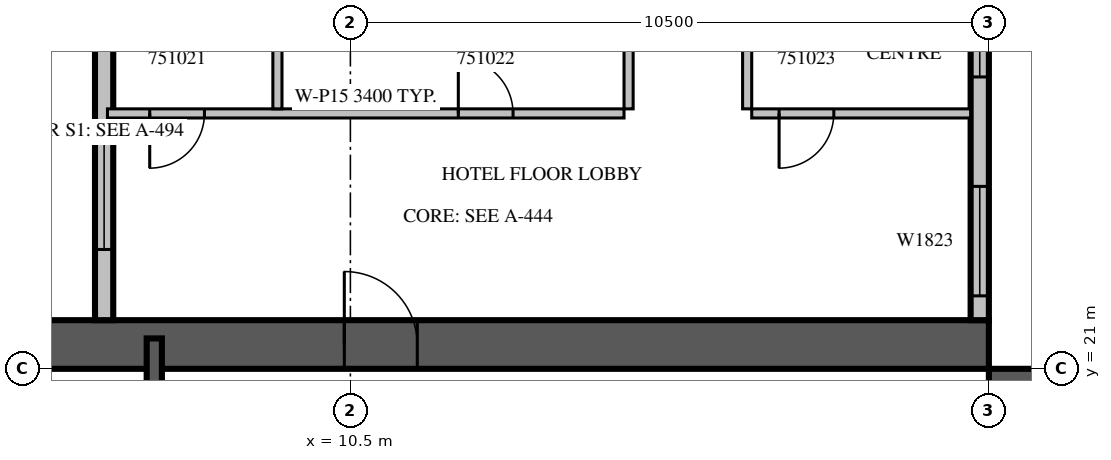
"""IFC4 building model, lengths in metres.
Left out: names, types, materials, properties, quantities, classifications, styles, units other than length and angle.
Written with IfcOpenShell. Run it as: python <this file> out.ifc"""

import sys

from ifc_helpers import new_model, si_unit, direction, frame, frame_2d, origin, place, context, subcontext, project, spatial, rectangle, extrude, source, transform, mapped, element, fill, save


model = new_model("IFC4")
c1 = context("Model", 3, precision=1e-05, world=origin(), true_north=direction((0.0, 1.0)))
c2 = subcontext(c1, "Body", "Model", "MODEL_VIEW")
j1 = project(units=[si_unit("LENGTHUNIT", "METRE"), si_unit("PLANEANGLEUNIT", "RADIAN")], contexts=[c1])
p1 = place(None, origin())
s1 = spatial("IfcSite", under=j1, at=p1, CompositionType="ELEMENT")
p2 = place(p1, origin())
s2 = spatial("IfcBuilding", under=s1, at=p2, CompositionType="ELEMENT")
p3 = place(p2, frame((0.0, 0.0, 227.2)))
s3 = spatial("IfcBuildingStorey", under=s2, at=p3, CompositionType="ELEMENT", Elevation=227.2)
m1 = source(origin(), c2, "Body", "SweptSolid", [
    extrude(rectangle(XDim=16.8, YDim=0.8, at=frame_2d((8.4, 0.0))), origin(), (0.0, 0.0, 1.0), 3.8),
])
p4 = place(p3, frame((21.4, 4.2, 0.0), z_axis=(0.0, 0.0, 1.0), x_axis=(0.0, 1.0, 0.0)))
e1 = element("IfcWall", 1, at=p4, inside=s3, PredefinedType="SHEAR", context=c2, shape_type="MappedRepresentation", body=[
    mapped(m1, transform((0.0, 0.0, 0.0), scale=1.0)),
])
m2 = source(origin(), c2, "Body", "SweptSolid", [
    extrude(rectangle(XDim=2.2, YDim=2.1, at=frame_2d((1.1, 1.05))), frame((0.0, 0.41, 0.0), z_axis=(0.0, -1.0, 0.0), x_axis=(1.0, 0.0, 0.0)), (0.0, 0.0, 1.0), 0.82),
])
p5 = place(p4, frame((4.2, 0.0, 0.0)))
e2 = element("IfcOpeningElement", 2, at=p5, cuts=e1, PredefinedType="OPENING", context=c2, shape_type="MappedRepresentation", body=[
    mapped(m2, transform((0.0, 0.0, 0.0), scale=1.0)),
])
m3 = source(origin(), c2, "Body", "SweptSolid", [
    extrude(rectangle(XDim=1.2, YDim=2.1, at=frame_2d((0.6, 1.05))), frame((0.0, 0.41, 0.0), z_axis=(0.0, -1.0, 0.0), x_axis=(1.0, 0.0, 0.0)), (0.0, 0.0, 1.0), 0.82),
])
p6 = place(p4, frame((14.7, 0.0, 0.0)))
e3 = element("IfcOpeningElement", 3, at=p6, cuts=e1, PredefinedType="OPENING", context=c2, shape_type="MappedRepresentation", body=[
    mapped(m3, transform((0.0, 0.0, 0.0), scale=1.0)),
])
p7 = place(p3, frame((4.2, 21.4, 0.0), z_axis=(0.0, 0.0, 1.0), x_axis=(1.0, 0.0, 0.0)))
e4 = element("IfcWall", 4, at=p7, inside=s3, PredefinedType="SHEAR", context=c2, shape_type="MappedRepresentation", body=[
    mapped(m1, transform((0.0, 0.0, 0.0), scale=1.0)),
])
p8 = place(p7, frame((6.2, 0.0, 0.0)))
e5 = element("IfcOpeningElement", 5, at=p8, cuts=e4, PredefinedType="OPENING", context=c2, shape_type="MappedRepresentation", body=[
    mapped(m3, transform((0.0, 0.0, 0.0), scale=1.0)),
])
m4 = source(origin(), c2, "Body", "SweptSolid", [
    extrude(rectangle(XDim=7.2, YDim=0.3, at=frame_2d((3.6, 0.0))), origin(), (0.0, 0.0, 1.0), 3.4),
])
p9 = place(p3, frame((20.85, 21.8, 0.0), z_axis=(0.0, 0.0, 1.0), x_axis=(0.0, 1.0, 0.0)))
e6 = element("IfcWall", 6, at=p9, inside=s3, PredefinedType="STANDARD", context=c2, shape_type="MappedRepresentation", body=[
    mapped(m4, transform((0.0, 0.0, 0.0), scale=1.0)),
])
m5 = source(origin(), c2, "Body", "SweptSolid", [
    extrude(rectangle(XDim=1.8, YDim=2.3, at=frame_2d((0.9, 1.15))), frame((0.0, 0.16, 0.0), z_axis=(0.0, -1.0, 0.0), x_axis=(1.0, 0.0, 0.0)), (0.0, 0.0, 1.0), 0.32),
])
p10 = place(p9, frame((0.4, 0.0, 0.6)))
e7 = element("IfcOpeningElement", 7, at=p10, cuts=e6, PredefinedType="OPENING", context=c2, shape_type="MappedRepresentation", body=[
    mapped(m5, transform((0.0, 0.0, 0.0), scale=1.0)),
])
m6 = source(origin(), c2, "Body", "SweptSolid", [
    extrude(rectangle(XDim=3.0, YDim=2.3, at=frame_2d((1.5, 1.15))), frame((0.0, 0.16, 0.0), z_axis=(0.0, -1.0, 0.0), x_axis=(1.0, 0.0, 0.0)), (0.0, 0.0, 1.0), 0.32),
])
p11 = place(p9, frame((4.0, 0.0, 0.6)))
e8 = element("IfcOpeningElement", 8, at=p11, cuts=e6, PredefinedType="OPENING", context=c2, shape_type="MappedRepresentation", body=[
    mapped(m6, transform((0.0, 0.0, 0.0), scale=1.0)),
])
m7 = source(origin(), c2, "Body", "SweptSolid", [
    extrude(rectangle(XDim=8.6, YDim=0.3, at=frame_2d((4.3, 0.0))), origin(), (0.0, 0.0, 1.0), 3.4),
])
p12 = place(p3, frame((6.45, 30.4, 0.0), z_axis=(0.0, 0.0, 1.0), x_axis=(0.0, -1.0, 0.0)))
e9 = element("IfcWall", 9, at=p12, inside=s3, PredefinedType="STANDARD", context=c2, shape_type="MappedRepresentation", body=[
    mapped(m7, transform((0.0, 0.0, 0.0), scale=1.0)),
])
p13 = place(p12, frame((1.438, 0.0, 0.6)))
e10 = element("IfcOpeningElement", 10, at=p13, cuts=e9, PredefinedType="OPENING", context=c2, shape_type="MappedRepresentation", body=[
    mapped(m5, transform((0.0, 0.0, 0.0), scale=1.0)),
])
p14 = place(p12, frame((5.638, 0.0, 0.6)))
e11 = element("IfcOpeningElement", 11, at=p14, cuts=e9, PredefinedType="OPENING", context=c2, shape_type="MappedRepresentation", body=[
    mapped(m5, transform((0.0, 0.0, 0.0), scale=1.0)),
])
m8 = source(origin(), c2, "Body", "SweptSolid", [
    extrude(rectangle(XDim=6.6, YDim=0.25, at=frame_2d((3.3, 0.0))), origin(), (0.0, 0.0, 1.0), 3.4),
])
p15 = place(p3, frame((7.275, 14.9, 0.0), z_axis=(0.0, 0.0, 1.0), x_axis=(0.0, 1.0, 0.0)))
e12 = element("IfcWall", 12, at=p15, inside=s3, PredefinedType="SOLIDWALL", context=c2, shape_type="MappedRepresentation", body=[
    mapped(m8, transform((0.0, 0.0, 0.0), scale=1.0)),
])
m9 = source(origin(), c2, "Body", "SweptSolid", [
    extrude(rectangle(XDim=1.1, YDim=2.1, at=frame_2d((0.55, 1.05))), frame((0.0, 0.135, 0.0), z_axis=(0.0, -1.0, 0.0), x_axis=(1.0, 0.0, 0.0)), (0.0, 0.0, 1.0), 0.27),
])
p16 = place(p15, frame((0.15, 0.0, 0.0)))
e13 = element("IfcOpeningElement", 13, at=p16, cuts=e12, PredefinedType="OPENING", context=c2, shape_type="MappedRepresentation", body=[
    mapped(m9, transform((0.0, 0.0, 0.0), scale=1.0)),
])
m10 = source(origin(), c2, "Body", "SweptSolid", [
    extrude(rectangle(XDim=8.495, YDim=0.15, at=frame_2d((4.247, 0.0))), origin(), (0.0, 0.0, 1.0), 3.4),
])
p17 = place(p3, frame((6.505, 25.2, 0.0), z_axis=(0.0, 0.0, 1.0), x_axis=(1.0, 0.0, 0.0)))
e14 = element("IfcWall", 14, at=p17, inside=s3, PredefinedType="PARTITIONING", context=c2, shape_type="MappedRepresentation", body=[
    mapped(m10, transform((0.0, 0.0, 0.0), scale=1.0)),
])
m11 = source(origin(), c2, "Body", "SweptSolid", [
    extrude(rectangle(XDim=0.9, YDim=2.1, at=frame_2d((0.45, 1.05))), frame((0.0, 0.085, 0.0), z_axis=(0.0, -1.0, 0.0), x_axis=(1.0, 0.0, 0.0)), (0.0, 0.0, 1.0), 0.17),
])
p18 = place(p17, frame((0.695, 0.0, 0.0)))
e15 = element("IfcOpeningElement", 15, at=p18, cuts=e14, PredefinedType="OPENING", context=c2, shape_type="MappedRepresentation", body=[
    mapped(m11, transform((0.0, 0.0, 0.0), scale=1.0)),
])
p19 = place(p17, frame((5.77, 0.0, 0.0)))
e16 = element("IfcOpeningElement", 16, at=p19, cuts=e14, PredefinedType="OPENING", context=c2, shape_type="MappedRepresentation", body=[
    mapped(m11, transform((0.0, 0.0, 0.0), scale=1.0)),
])
m12 = source(origin(), c2, "Body", "SweptSolid", [
    extrude(rectangle(XDim=3.6, YDim=0.15, at=frame_2d((1.8, 0.0))), origin(), (0.0, 0.0, 1.0), 3.4),
])
p20 = place(p3, frame((17.1, 25.2, 0.0), z_axis=(0.0, 0.0, 1.0), x_axis=(1.0, 0.0, 0.0)))
e17 = element("IfcWall", 17, at=p20, inside=s3, PredefinedType="PARTITIONING", context=c2, shape_type="MappedRepresentation", body=[
    mapped(m12, transform((0.0, 0.0, 0.0), scale=1.0)),
])
p21 = place(p20, frame((0.45, 0.0, 0.0)))
e18 = element("IfcOpeningElement", 18, at=p21, cuts=e17, PredefinedType="OPENING", context=c2, shape_type="MappedRepresentation", body=[
    mapped(m11, transform((0.0, 0.0, 0.0), scale=1.0)),
])
m13 = source(origin(), c2, "Body", "SweptSolid", [
    extrude(rectangle(XDim=4.05, YDim=0.15, at=frame_2d((2.025, 0.0))), origin(), (0.0, 0.0, 1.0), 3.4),
])
for number, where, z_axis, x_axis in (
    (19, (9.3, 25.275, 0.0), (0.0, 0.0, 1.0), (0.0, 1.0, 0.0)),
    (20, (15.075, 25.275, 0.0), (0.0, 0.0, 1.0), (0.0, 1.0, 0.0)),
    (21, (17.025, 29.325, 0.0), (0.0, 0.0, 1.0), (0.0, -1.0, 0.0)),
):
    element("IfcWall", number, at=place(p3, frame(where, z_axis=z_axis, x_axis=x_axis)), inside=s3, PredefinedType="PARTITIONING", context=c2, shape_type="MappedRepresentation", body=[
        mapped(m13, transform((0.0, 0.0, 0.0), scale=1.0)),
    ])
m14 = source(origin(), c2, "Body", "SweptSolid", [
    extrude(rectangle(XDim=1.8, YDim=2.3, at=frame_2d((0.9, 1.15))), frame((0.0, 0.03, 0.0), z_axis=(0.0, -1.0, 0.0), x_axis=(1.0, 0.0, 0.0)), (0.0, 0.0, 1.0), 0.06),
])
p22 = place(p10, origin())
e22 = element("IfcWindow", 22, at=p22, inside=s3, PartitioningType="SINGLE_PANEL", PredefinedType="WINDOW", context=c2, shape_type="MappedRepresentation", body=[
    mapped(m14, transform((0.0, 0.0, 0.0), scale=1.0)),
])
fill(e7, e22)
m15 = source(origin(), c2, "Body", "SweptSolid", [
    extrude(rectangle(XDim=3.0, YDim=2.3, at=frame_2d((1.5, 1.15))), frame((0.0, 0.03, 0.0), z_axis=(0.0, -1.0, 0.0), x_axis=(1.0, 0.0, 0.0)), (0.0, 0.0, 1.0), 0.06),
])
p23 = place(p11, origin())
e23 = element("IfcWindow", 23, at=p23, inside=s3, PartitioningType="SINGLE_PANEL", PredefinedType="WINDOW", context=c2, shape_type="MappedRepresentation", body=[
    mapped(m15, transform((0.0, 0.0, 0.0), scale=1.0)),
])
fill(e8, e23)
p24 = place(p14, origin())
e24 = element("IfcWindow", 24, at=p24, inside=s3, PartitioningType="SINGLE_PANEL", PredefinedType="WINDOW", context=c2, shape_type="MappedRepresentation", body=[
    mapped(m14, transform((0.0, 0.0, 0.0), scale=1.0)),
])
fill(e11, e24)
m16 = source(origin(), c2, "Body", "SweptSolid", [
    extrude(rectangle(XDim=1.2, YDim=2.1, at=frame_2d((0.6, 1.05))), frame((0.0, 0.025, 0.0), z_axis=(0.0, -1.0, 0.0), x_axis=(1.0, 0.0, 0.0)), (0.0, 0.0, 1.0), 0.05),
])
p25 = place(p8, origin())
e25 = element("IfcDoor", 25, at=p25, inside=s3, OperationType="SINGLE_SWING_LEFT", PredefinedType="DOOR", context=c2, shape_type="MappedRepresentation", body=[
    mapped(m16, transform((0.0, 0.0, 0.0), scale=1.0)),
])
fill(e5, e25)
m17 = source(origin(), c2, "Body", "SweptSolid", [
    extrude(rectangle(XDim=0.9, YDim=2.1, at=frame_2d((0.45, 1.05))), frame((0.0, 0.025, 0.0), z_axis=(0.0, -1.0, 0.0), x_axis=(1.0, 0.0, 0.0)), (0.0, 0.0, 1.0), 0.05),
])
p26 = place(p18, origin())
e26 = element("IfcDoor", 26, at=p26, inside=s3, OperationType="SINGLE_SWING_RIGHT", PredefinedType="DOOR", context=c2, shape_type="MappedRepresentation", body=[
    mapped(m17, transform((0.0, 0.0, 0.0), scale=1.0)),
])
fill(e15, e26)
p27 = place(p19, origin())
e27 = element("IfcDoor", 27, at=p27, inside=s3, OperationType="SINGLE_SWING_LEFT", PredefinedType="DOOR", context=c2, shape_type="MappedRepresentation", body=[
    mapped(m17, transform((0.0, 0.0, 0.0), scale=1.0)),
])
fill(e16, e27)
p28 = place(p21, origin())
e28 = element("IfcDoor", 28, at=p28, inside=s3, OperationType="SINGLE_SWING_RIGHT", PredefinedType="DOOR", context=c2, shape_type="MappedRepresentation", body=[
    mapped(m17, transform((0.0, 0.0, 0.0), scale=1.0)),
])
fill(e18, e28)
save(model, sys.argv[1])
